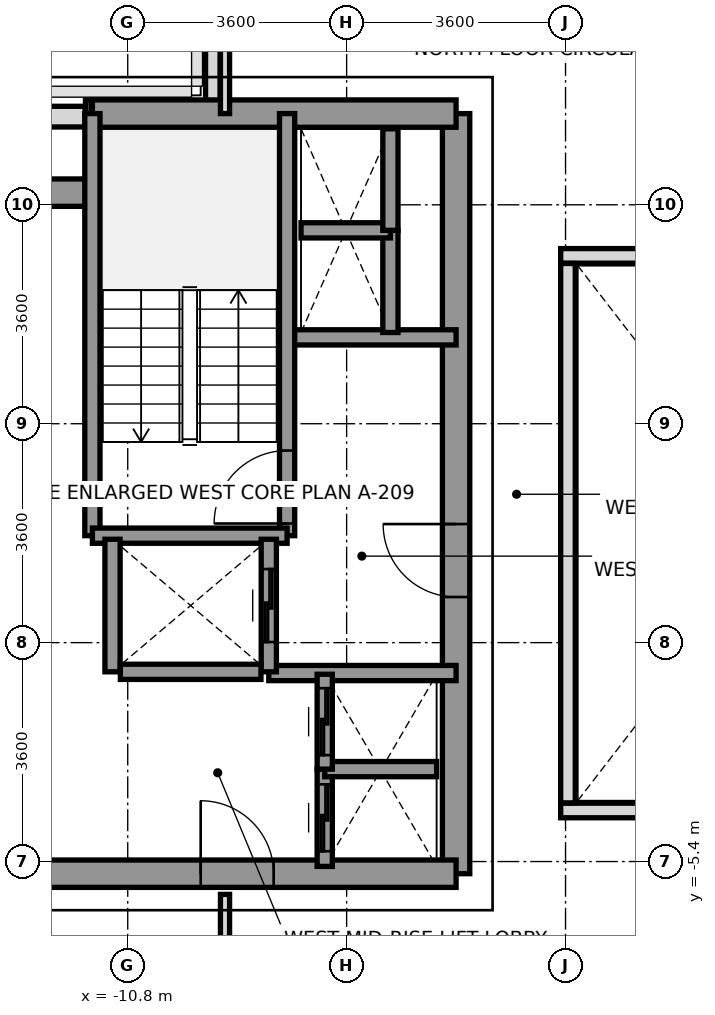
"""IFC4 building model, lengths in metres.
Left out: names, types, materials, properties, quantities, classifications, styles, units other than length and angle.
Written with IfcOpenShell. Run it as: python <this file> out.ifc"""

import sys

from ifc_helpers import new_model, si_unit, direction, frame, frame_2d, origin, place, context, subcontext, project, spatial, rectangle, extrude, source, transform, mapped, element, fill, save


model = new_model("IFC4")
c1 = context("Model", 3, precision=1e-05, world=origin(), true_north=direction((0.0, 1.0)))
c2 = subcontext(c1, "Body", "Model", "MODEL_VIEW")
j1 = project(units=[si_unit("LENGTHUNIT", "METRE"), si_unit("PLANEANGLEUNIT", "RADIAN")], contexts=[c1])
p1 = place(None, origin())
s1 = spatial("IfcSite", under=j1, at=p1, CompositionType="ELEMENT")
p2 = place(p1, origin())
s2 = spatial("IfcBuilding", under=s1, at=p2, CompositionType="ELEMENT")
p3 = place(p2, frame((0.0, 0.0, 138.0)))
s3 = spatial("IfcBuildingStorey", under=s2, at=p3, CompositionType="ELEMENT", Elevation=138.0)
p4 = place(p3, frame((-14.083, 6.85, 0.0), z_axis=(0.0, 0.0, 1.0), x_axis=(1.0, 0.0, 0.0)))
e1 = element("IfcWall", 1, at=p4, inside=s3, PredefinedType="SOLIDWALL", context=c2, shape_type="SweptSolid", body=[
    extrude(rectangle(XDim=2.585, YDim=0.34, at=frame_2d((1.292, 0.0))), origin(), (0.0, 0.0, 1.0), 3.2),
])
p5 = place(p3, frame((-11.495, 7.0, 0.0), z_axis=(0.0, 0.0, 1.0), x_axis=(1.0, 0.0, 0.0)))
e2 = element("IfcWall", 2, at=p5, inside=s3, PredefinedType="PARAPET", context=c2, shape_type="SweptSolid", body=[
    extrude(rectangle(XDim=0.092, YDim=0.24, at=frame_2d((0.046, 0.0))), origin(), (0.0, 0.0, 1.0), 1.15),
])
p6 = place(p3, frame((-9.4, 6.953, 0.0), z_axis=(0.0, 0.0, 1.0), x_axis=(0.0, 1.0, 0.0)))
e3 = element("IfcWall", 3, at=p6, inside=s3, PredefinedType="PARAPET", context=c2, shape_type="SweptSolid", body=[
    extrude(rectangle(XDim=1.519, YDim=0.24, at=frame_2d((0.76, 0.0))), origin(), (0.0, 0.0, 1.0), 1.15),
])
p7 = place(p3, frame((-5.4, -5.6, 0.0), z_axis=(0.0, 0.0, 1.0), x_axis=(0.0, 1.0, 0.0)))
e4 = element("IfcWall", 4, at=p7, inside=s3, PredefinedType="SHEAR", context=c2, shape_type="SweptSolid", body=[
    extrude(rectangle(XDim=12.5, YDim=0.45, at=frame_2d((6.25, 0.0))), origin(), (0.0, 0.0, 1.0), 3.2),
])
p8 = place(p7, frame((4.55, 0.0, 0.0)))
e5 = element("IfcOpeningElement", 5, at=p8, cuts=e4, PredefinedType="OPENING", context=c2, shape_type="SweptSolid", body=[
    extrude(rectangle(XDim=1.2, YDim=2.2, at=frame_2d((0.6, 1.1))), frame((0.0, 0.235, 0.0), z_axis=(0.0, -1.0, 0.0), x_axis=(1.0, 0.0, 0.0)), (0.0, 0.0, 1.0), 0.47),
])
p9 = place(p3, frame((-11.381, 6.9, 0.0), z_axis=(0.0, 0.0, 1.0), x_axis=(1.0, 0.0, 0.0)))
e6 = element("IfcWall", 6, at=p9, inside=s3, PredefinedType="SHEAR", context=c2, shape_type="SweptSolid", body=[
    extrude(rectangle(XDim=5.981, YDim=0.45, at=frame_2d((2.991, 0.0))), origin(), (0.0, 0.0, 1.0), 3.2),
])
p10 = place(p3, frame((-13.2, 5.6, 0.0), z_axis=(0.0, 0.0, 1.0), x_axis=(1.0, 0.0, 0.0)))
e7 = element("IfcWall", 7, at=p10, inside=s3, PredefinedType="SHEAR", context=c2, shape_type="SweptSolid", body=[
    extrude(rectangle(XDim=1.819, YDim=0.45, at=frame_2d((0.909, 0.0))), origin(), (0.0, 0.0, 1.0), 3.2),
])
p11 = place(p3, frame((-13.2, -5.6, 0.0), z_axis=(0.0, 0.0, 1.0), x_axis=(1.0, 0.0, 0.0)))
e8 = element("IfcWall", 8, at=p11, inside=s3, PredefinedType="SHEAR", context=c2, shape_type="SweptSolid", body=[
    extrude(rectangle(XDim=7.8, YDim=0.45, at=frame_2d((3.9, 0.0))), origin(), (0.0, 0.0, 1.0), 3.2),
])
p12 = place(p11, frame((3.6, 0.0, 0.0)))
e9 = element("IfcOpeningElement", 9, at=p12, cuts=e8, PredefinedType="OPENING", context=c2, shape_type="SweptSolid", body=[
    extrude(rectangle(XDim=1.2, YDim=2.2, at=frame_2d((0.6, 1.1))), frame((0.0, 0.235, 0.0), z_axis=(0.0, -1.0, 0.0), x_axis=(1.0, 0.0, 0.0)), (0.0, 0.0, 1.0), 0.47),
])
p13 = place(p3, frame((-8.18, 3.22, 0.0), z_axis=(0.0, 0.0, 1.0), x_axis=(1.0, 0.0, 0.0)))
e10 = element("IfcWall", 10, at=p13, inside=s3, PredefinedType="SOLIDWALL", context=c2, shape_type="SweptSolid", body=[
    extrude(rectangle(XDim=2.78, YDim=0.25, at=frame_2d((1.39, 0.0))), origin(), (0.0, 0.0, 1.0), 3.2),
])
p14 = place(p3, frame((-8.48, -2.3, 0.0), z_axis=(0.0, 0.0, 1.0), x_axis=(1.0, 0.0, 0.0)))
e11 = element("IfcWall", 11, at=p14, inside=s3, PredefinedType="SOLIDWALL", context=c2, shape_type="SweptSolid", body=[
    extrude(rectangle(XDim=3.08, YDim=0.25, at=frame_2d((1.54, 0.0))), origin(), (0.0, 0.0, 1.0), 3.2),
])
p15 = place(p3, frame((-8.179, -0.041, 0.0), z_axis=(0.0, 0.0, 1.0), x_axis=(0.0, 1.0, 0.0)))
e12 = element("IfcWall", 12, at=p15, inside=s3, PredefinedType="SOLIDWALL", context=c2, shape_type="SweptSolid", body=[
    extrude(rectangle(XDim=6.941, YDim=0.25, at=frame_2d((3.47, 0.0))), origin(), (0.0, 0.0, 1.0), 3.2),
])
p16 = place(p15, frame((0.2, 0.0, 0.0)))
e13 = element("IfcOpeningElement", 13, at=p16, cuts=e12, PredefinedType="OPENING", context=c2, shape_type="SweptSolid", body=[
    extrude(rectangle(XDim=1.2, YDim=2.2, at=frame_2d((0.6, 1.1))), frame((0.0, 0.135, 0.0), z_axis=(0.0, -1.0, 0.0), x_axis=(1.0, 0.0, 0.0)), (0.0, 0.0, 1.0), 0.27),
])
p17 = place(p3, frame((-11.381, -0.041, 0.0), z_axis=(0.0, 0.0, 1.0), x_axis=(0.0, 1.0, 0.0)))
e14 = element("IfcWall", 14, at=p17, inside=s3, PredefinedType="SOLIDWALL", context=c2, shape_type="SweptSolid", body=[
    extrude(rectangle(XDim=6.941, YDim=0.25, at=frame_2d((3.47, 0.0))), origin(), (0.0, 0.0, 1.0), 3.2),
])
p18 = place(p3, frame((-11.381, -0.041, 0.0), z_axis=(0.0, 0.0, 1.0), x_axis=(1.0, 0.0, 0.0)))
e15 = element("IfcWall", 15, at=p18, inside=s3, PredefinedType="SOLIDWALL", context=c2, shape_type="SweptSolid", body=[
    extrude(rectangle(XDim=3.202, YDim=0.25, at=frame_2d((1.601, 0.0))), origin(), (0.0, 0.0, 1.0), 3.2),
])
p19 = place(p3, frame((-11.05, -2.28, 0.0), z_axis=(0.0, 0.0, 1.0), x_axis=(0.0, 1.0, 0.0)))
e16 = element("IfcWall", 16, at=p19, inside=s3, PredefinedType="SOLIDWALL", context=c2, shape_type="SweptSolid", body=[
    extrude(rectangle(XDim=2.18, YDim=0.25, at=frame_2d((1.09, 0.0))), origin(), (0.0, 0.0, 1.0), 3.2),
])
p20 = place(p3, frame((-8.48, -2.28, 0.0), z_axis=(0.0, 0.0, 1.0), x_axis=(0.0, 1.0, 0.0)))
e17 = element("IfcWall", 17, at=p20, inside=s3, PredefinedType="SOLIDWALL", context=c2, shape_type="SweptSolid", body=[
    extrude(rectangle(XDim=2.18, YDim=0.25, at=frame_2d((1.09, 0.0))), origin(), (0.0, 0.0, 1.0), 3.2),
])
p21 = place(p20, frame((0.49, 0.0, 0.0)))
e18 = element("IfcOpeningElement", 18, at=p21, cuts=e17, PredefinedType="OPENING", context=c2, shape_type="SweptSolid", body=[
    extrude(rectangle(XDim=1.2, YDim=2.2, at=frame_2d((0.6, 1.1))), frame((0.0, 0.135, 0.0), z_axis=(0.0, -1.0, 0.0), x_axis=(1.0, 0.0, 0.0)), (0.0, 0.0, 1.0), 0.27),
])
p22 = place(p3, frame((-10.921, -2.28, 0.0), z_axis=(0.0, 0.0, 1.0), x_axis=(1.0, 0.0, 0.0)))
e19 = element("IfcWall", 19, at=p22, inside=s3, PredefinedType="SOLIDWALL", context=c2, shape_type="SweptSolid", body=[
    extrude(rectangle(XDim=2.312, YDim=0.25, at=frame_2d((1.156, 0.0))), origin(), (0.0, 0.0, 1.0), 3.2),
])
p23 = place(p3, frame((-7.56, -5.48, 0.0), z_axis=(0.0, 0.0, 1.0), x_axis=(0.0, 1.0, 0.0)))
e20 = element("IfcWall", 20, at=p23, inside=s3, PredefinedType="SOLIDWALL", context=c2, shape_type="SweptSolid", body=[
    extrude(rectangle(XDim=1.6, YDim=0.25, at=frame_2d((0.8, 0.0))), origin(), (0.0, 0.0, 1.0), 3.2),
])
p24 = place(p23, frame((0.25, 0.0, 0.0)))
e21 = element("IfcOpeningElement", 21, at=p24, cuts=e20, PredefinedType="OPENING", context=c2, shape_type="SweptSolid", body=[
    extrude(rectangle(XDim=1.1, YDim=2.2, at=frame_2d((0.55, 1.1))), frame((0.0, 0.135, 0.0), z_axis=(0.0, -1.0, 0.0), x_axis=(1.0, 0.0, 0.0)), (0.0, 0.0, 1.0), 0.27),
])
p25 = place(p3, frame((-7.56, -3.88, 0.0), z_axis=(0.0, 0.0, 1.0), x_axis=(1.0, 0.0, 0.0)))
e22 = element("IfcWall", 22, at=p25, inside=s3, PredefinedType="SOLIDWALL", context=c2, shape_type="SweptSolid", body=[
    extrude(rectangle(XDim=1.84, YDim=0.25, at=frame_2d((0.92, 0.0))), origin(), (0.0, 0.0, 1.0), 3.2),
])
p26 = place(p3, frame((-7.56, -3.88, 0.0), z_axis=(0.0, 0.0, 1.0), x_axis=(0.0, 1.0, 0.0)))
e23 = element("IfcWall", 23, at=p26, inside=s3, PredefinedType="SOLIDWALL", context=c2, shape_type="SweptSolid", body=[
    extrude(rectangle(XDim=1.56, YDim=0.25, at=frame_2d((0.78, 0.0))), origin(), (0.0, 0.0, 1.0), 3.2),
])
p27 = place(p26, frame((0.23, 0.0, 0.0)))
e24 = element("IfcOpeningElement", 24, at=p27, cuts=e23, PredefinedType="OPENING", context=c2, shape_type="SweptSolid", body=[
    extrude(rectangle(XDim=1.1, YDim=2.2, at=frame_2d((0.55, 1.1))), frame((0.0, 0.135, 0.0), z_axis=(0.0, -1.0, 0.0), x_axis=(1.0, 0.0, 0.0)), (0.0, 0.0, 1.0), 0.27),
])
p28 = place(p3, frame((-6.48, 3.3, 0.0), z_axis=(0.0, 0.0, 1.0), x_axis=(0.0, 1.0, 0.0)))
e25 = element("IfcWall", 25, at=p28, inside=s3, PredefinedType="SOLIDWALL", context=c2, shape_type="SweptSolid", body=[
    extrude(rectangle(XDim=1.68, YDim=0.25, at=frame_2d((0.84, 0.0))), origin(), (0.0, 0.0, 1.0), 3.2),
])
p29 = place(p3, frame((-7.95, 4.98, 0.0), z_axis=(0.0, 0.0, 1.0), x_axis=(1.0, 0.0, 0.0)))
e26 = element("IfcWall", 26, at=p29, inside=s3, PredefinedType="SOLIDWALL", context=c2, shape_type="SweptSolid", body=[
    extrude(rectangle(XDim=1.47, YDim=0.25, at=frame_2d((0.735, 0.0))), origin(), (0.0, 0.0, 1.0), 3.2),
])
p30 = place(p3, frame((-6.48, 4.98, 0.0), z_axis=(0.0, 0.0, 1.0), x_axis=(0.0, 1.0, 0.0)))
e27 = element("IfcWall", 27, at=p30, inside=s3, PredefinedType="SOLIDWALL", context=c2, shape_type="SweptSolid", body=[
    extrude(rectangle(XDim=1.67, YDim=0.25, at=frame_2d((0.835, 0.0))), origin(), (0.0, 0.0, 1.0), 3.2),
])
p31 = place(p3, frame((-9.2, 6.9, 0.0), z_axis=(0.0, 0.0, 1.0), x_axis=(0.0, 1.0, 0.0)))
e28 = element("IfcWall", 28, at=p31, inside=s3, PredefinedType="PARTITIONING", context=c2, shape_type="SweptSolid", body=[
    extrude(rectangle(XDim=8.78, YDim=0.15, at=frame_2d((4.39, 0.0))), origin(), (0.0, 0.0, 1.0), 2.7),
])
p32 = place(p3, frame((-9.2, -15.68, 0.0), z_axis=(0.0, 0.0, 1.0), x_axis=(0.0, 1.0, 0.0)))
e29 = element("IfcWall", 29, at=p32, inside=s3, PredefinedType="PARTITIONING", context=c2, shape_type="SweptSolid", body=[
    extrude(rectangle(XDim=9.74, YDim=0.15, at=frame_2d((4.87, 0.0))), origin(), (0.0, 0.0, 1.0), 2.7),
])
for number, where, z_axis, x_axis in (
    (30, (-3.68, -4.56, 0.0), (0.0, 0.0, 1.0), (1.0, 0.0, 0.0)),
    (31, (-3.68, 4.56, 0.0), (0.0, 0.0, 1.0), (1.0, 0.0, 0.0)),
):
    element("IfcWall", number, at=place(p3, frame(where, z_axis=z_axis, x_axis=x_axis)), inside=s3, PredefinedType="PARAPET", context=c2, shape_type="SweptSolid", body=[
        extrude(rectangle(XDim=7.36, YDim=0.24, at=frame_2d((3.68, 0.0))), origin(), (0.0, 0.0, 1.0), 1.15),
    ])
p33 = place(p3, frame((-3.56, -4.435, 0.0), z_axis=(0.0, 0.0, 1.0), x_axis=(0.0, 1.0, 0.0)))
e32 = element("IfcWall", 32, at=p33, inside=s3, PredefinedType="PARAPET", context=c2, shape_type="SweptSolid", body=[
    extrude(rectangle(XDim=8.87, YDim=0.24, at=frame_2d((4.435, 0.0))), origin(), (0.0, 0.0, 1.0), 1.15),
])
m1 = source(origin(), c2, "Body", "SweptSolid", [
    extrude(rectangle(XDim=1.2, YDim=2.2, at=frame_2d((0.6, 1.1))), frame((0.0, 0.025, 0.0), z_axis=(0.0, -1.0, 0.0), x_axis=(1.0, 0.0, 0.0)), (0.0, 0.0, 1.0), 0.05),
])
p34 = place(p16, origin())
e33 = element("IfcDoor", 33, at=p34, inside=s3, OperationType="SINGLE_SWING_LEFT", PredefinedType="DOOR", context=c2, shape_type="MappedRepresentation", body=[
    mapped(m1, transform((0.0, 0.0, 0.0), x_axis=(1.0, 0.0, 0.0), y_axis=(0.0, 1.0, 0.0), z_axis=(0.0, 0.0, 1.0), scale=1.0)),
])
fill(e13, e33)
p35 = place(p8, origin())
e34 = element("IfcDoor", 34, at=p35, inside=s3, OperationType="SINGLE_SWING_RIGHT", PredefinedType="DOOR", context=c2, shape_type="MappedRepresentation", body=[
    mapped(m1, transform((0.0, 0.0, 0.0), x_axis=(1.0, 0.0, 0.0), y_axis=(0.0, 1.0, 0.0), z_axis=(0.0, 0.0, 1.0), scale=1.0)),
])
fill(e5, e34)
p36 = place(p12, origin())
e35 = element("IfcDoor", 35, at=p36, inside=s3, OperationType="SINGLE_SWING_LEFT", PredefinedType="DOOR", context=c2, shape_type="MappedRepresentation", body=[
    mapped(m1, transform((0.0, 0.0, 0.0), x_axis=(1.0, 0.0, 0.0), y_axis=(0.0, 1.0, 0.0), z_axis=(0.0, 0.0, 1.0), scale=1.0)),
])
fill(e9, e35)
p37 = place(p21, origin())
e36 = element("IfcDoor", 36, at=p37, inside=s3, OperationType="SLIDING_TO_RIGHT", PredefinedType="DOOR", context=c2, shape_type="MappedRepresentation", body=[
    mapped(m1, transform((0.0, 0.0, 0.0), x_axis=(1.0, 0.0, 0.0), y_axis=(0.0, 1.0, 0.0), z_axis=(0.0, 0.0, 1.0), scale=1.0)),
])
fill(e18, e36)
m2 = source(origin(), c2, "Body", "SweptSolid", [
    extrude(rectangle(XDim=1.1, YDim=2.2, at=frame_2d((0.55, 1.1))), frame((0.0, 0.025, 0.0), z_axis=(0.0, -1.0, 0.0), x_axis=(1.0, 0.0, 0.0)), (0.0, 0.0, 1.0), 0.05),
])
p38 = place(p24, origin())
e37 = element("IfcDoor", 37, at=p38, inside=s3, OperationType="SLIDING_TO_LEFT", PredefinedType="DOOR", context=c2, shape_type="MappedRepresentation", body=[
    mapped(m2, transform((0.0, 0.0, 0.0), x_axis=(1.0, 0.0, 0.0), y_axis=(0.0, 1.0, 0.0), z_axis=(0.0, 0.0, 1.0), scale=1.0)),
])
fill(e21, e37)
p39 = place(p27, origin())
e38 = element("IfcDoor", 38, at=p39, inside=s3, OperationType="SLIDING_TO_LEFT", PredefinedType="DOOR", context=c2, shape_type="MappedRepresentation", body=[
    mapped(m2, transform((0.0, 0.0, 0.0), x_axis=(1.0, 0.0, 0.0), y_axis=(0.0, 1.0, 0.0), z_axis=(0.0, 0.0, 1.0), scale=1.0)),
])
fill(e24, e38)
save(model, sys.argv[1])
